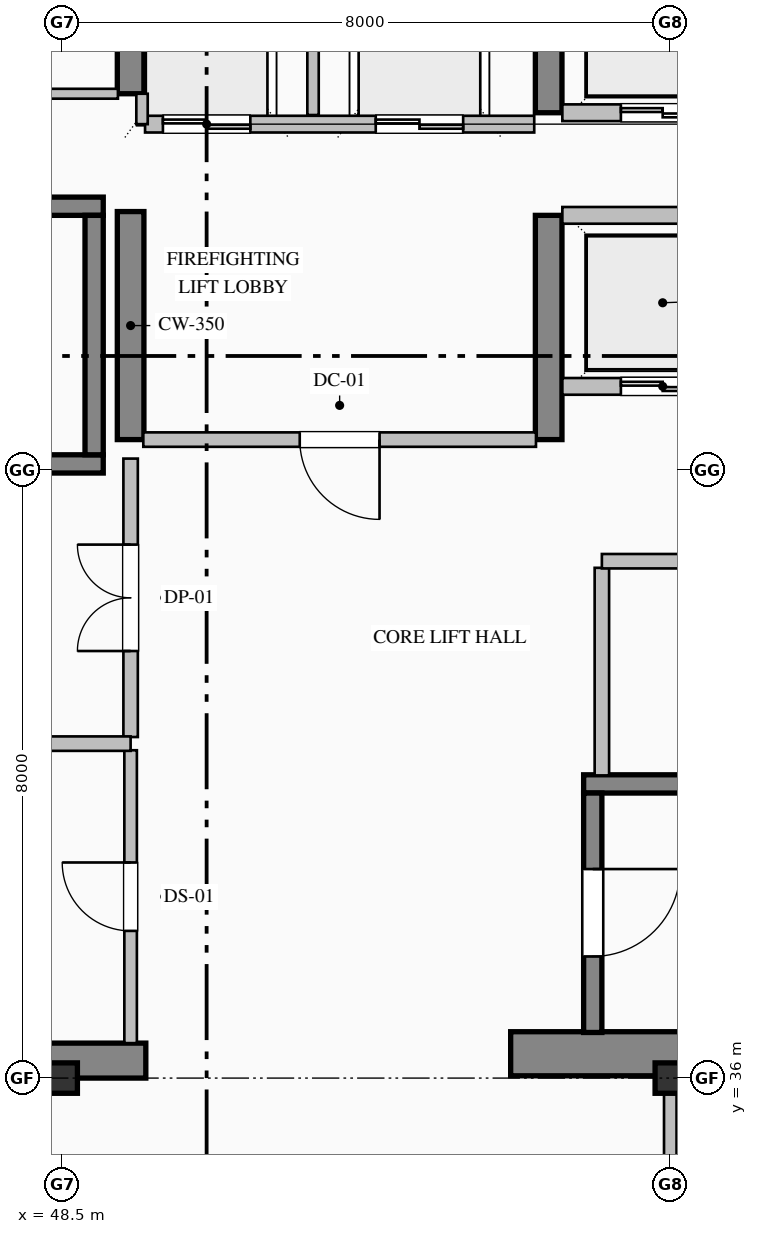
"""IFC4 building model, lengths in metres.
Left out: names, types, materials, properties, quantities, classifications, styles, units other than length and angle.
Written with IfcOpenShell. Run it as: python <this file> out.ifc"""

import sys

from ifc_helpers import new_model, si_unit, direction, frame, frame_2d, origin, origin_2d, place, context, subcontext, project, spatial, rectangle, i_section, extrude, element, fill, save


model = new_model("IFC4")
c1 = context("Model", 3, precision=1e-05, world=origin(), true_north=direction((0.0, 1.0)))
c2 = subcontext(c1, "Body", "Model", "MODEL_VIEW")
j1 = project(units=[si_unit("LENGTHUNIT", "METRE"), si_unit("PLANEANGLEUNIT", "RADIAN")], contexts=[c1])
p1 = place(None, origin())
s1 = spatial("IfcSite", under=j1, at=p1, CompositionType="ELEMENT")
p2 = place(p1, origin())
s2 = spatial("IfcBuilding", under=s1, at=p2, CompositionType="ELEMENT")
p3 = place(p2, frame((0.0, 0.0, 200.4)))
s3 = spatial("IfcBuildingStorey", under=s2, at=p3, CompositionType="ELEMENT", Elevation=200.4)
p4 = place(p3, frame((40.5, 36.23, 0.0), z_axis=(0.0, 0.0, 1.0), x_axis=(1.0, 0.0, 0.0)))
e1 = element("IfcWall", 1, at=p4, inside=s3, PredefinedType="SHEAR", context=c2, shape_type="SweptSolid", body=[
    extrude(rectangle(XDim=9.1, YDim=0.46, at=frame_2d((4.55, 0.0))), origin(), (0.0, 0.0, 1.0), 5.175),
])
p5 = place(p3, frame((54.4, 36.32, 0.0), z_axis=(0.0, 0.0, 1.0), x_axis=(1.0, 0.0, 0.0)))
e2 = element("IfcWall", 2, at=p5, inside=s3, PredefinedType="SHEAR", context=c2, shape_type="SweptSolid", body=[
    extrude(rectangle(XDim=9.6, YDim=0.58, at=frame_2d((4.8, 0.0))), origin(), (0.0, 0.0, 1.0), 5.4),
])
p6 = place(p3, frame((49.4, 44.4, 0.0), z_axis=(0.0, 0.0, 1.0), x_axis=(0.0, 1.0, 0.0)))
e3 = element("IfcWall", 3, at=p6, inside=s3, PredefinedType="SHEAR", context=c2, shape_type="SweptSolid", body=[
    extrude(rectangle(XDim=3.0, YDim=0.35, at=frame_2d((1.5, 0.0))), origin(), (0.0, 0.0, 1.0), 5.175),
])
p7 = place(p3, frame((49.4, 48.95, 0.0), z_axis=(0.0, 0.0, 1.0), x_axis=(0.0, 1.0, 0.0)))
e4 = element("IfcWall", 4, at=p7, inside=s3, PredefinedType="SHEAR", context=c2, shape_type="SweptSolid", body=[
    extrude(rectangle(XDim=2.59, YDim=0.35, at=frame_2d((1.295, 0.0))), origin(), (0.0, 0.0, 1.0), 5.175),
])
p8 = place(p3, frame((54.9, 44.4, 0.0), z_axis=(0.0, 0.0, 1.0), x_axis=(0.0, 1.0, 0.0)))
e5 = element("IfcWall", 5, at=p8, inside=s3, PredefinedType="SHEAR", context=c2, shape_type="SweptSolid", body=[
    extrude(rectangle(XDim=2.95, YDim=0.35, at=frame_2d((1.475, 0.0))), origin(), (0.0, 0.0, 1.0), 5.175),
])
p9 = place(p3, frame((54.9, 48.7, 0.0), z_axis=(0.0, 0.0, 1.0), x_axis=(0.0, 1.0, 0.0)))
e6 = element("IfcWall", 6, at=p9, inside=s3, PredefinedType="SHEAR", context=c2, shape_type="SweptSolid", body=[
    extrude(rectangle(XDim=2.84, YDim=0.35, at=frame_2d((1.42, 0.0))), origin(), (0.0, 0.0, 1.0), 5.175),
])
for number, where, z_axis, x_axis in (
    (7, (48.5, 36.0, 0.0), (0.0, 0.0, 1.0), (1.0, 0.0, 0.0)),
    (8, (56.5, 36.0, 0.0), (0.0, 0.0, 1.0), (1.0, 0.0, 0.0)),
):
    element("IfcColumn", number, at=place(p3, frame(where, z_axis=z_axis, x_axis=x_axis)), inside=s3, PredefinedType="COLUMN", context=c2, shape_type="SweptSolid", body=[
        extrude(i_section(OverallWidth=0.4, OverallDepth=0.4, WebThickness=0.013, FlangeThickness=0.021, FilletRadius=0.022, at=origin_2d()), origin(), (0.0, 0.0, 1.0), 5.4),
    ])
for number, where, z_axis, x_axis in (
    (9, (40.96, 47.47, 0.0), (0.0, 0.0, 1.0), (1.0, 0.0, 0.0)),
    (10, (49.04, 44.08, 0.0), (0.0, 0.0, 1.0), (-1.0, 0.0, 0.0)),
):
    element("IfcWall", number, at=place(p3, frame(where, z_axis=z_axis, x_axis=x_axis)), inside=s3, PredefinedType="SOLIDWALL", context=c2, shape_type="SweptSolid", body=[
        extrude(rectangle(XDim=8.08, YDim=0.24, at=frame_2d((4.04, 0.0))), origin(), (0.0, 0.0, 1.0), 5.4),
    ])
p10 = place(p3, frame((48.92, 44.2, 0.0), z_axis=(0.0, 0.0, 1.0), x_axis=(0.0, 1.0, 0.0)))
e11 = element("IfcWall", 11, at=p10, inside=s3, PredefinedType="SOLIDWALL", context=c2, shape_type="SweptSolid", body=[
    extrude(rectangle(XDim=3.15, YDim=0.24, at=frame_2d((1.575, 0.0))), origin(), (0.0, 0.0, 1.0), 5.4),
])
p11 = place(p3, frame((55.36, 39.87, 0.0), z_axis=(0.0, 0.0, 1.0), x_axis=(1.0, 0.0, 0.0)))
e12 = element("IfcWall", 12, at=p11, inside=s3, PredefinedType="SOLIDWALL", context=c2, shape_type="SweptSolid", body=[
    extrude(rectangle(XDim=8.08, YDim=0.24, at=frame_2d((4.04, 0.0))), origin(), (0.0, 0.0, 1.0), 5.4),
])
p12 = place(p3, frame((55.48, 39.75, 0.0), z_axis=(0.0, 0.0, 1.0), x_axis=(0.0, -1.0, 0.0)))
e13 = element("IfcWall", 13, at=p12, inside=s3, PredefinedType="SOLIDWALL", context=c2, shape_type="SweptSolid", body=[
    extrude(rectangle(XDim=3.15, YDim=0.24, at=frame_2d((1.575, 0.0))), origin(), (0.0, 0.0, 1.0), 5.4),
])
p13 = place(p12, frame((1.0, 0.0, 0.0)))
e14 = element("IfcOpeningElement", 14, at=p13, cuts=e13, PredefinedType="OPENING", context=c2, shape_type="SweptSolid", body=[
    extrude(rectangle(XDim=1.15, YDim=2.2, at=frame_2d((0.575, 1.1))), frame((0.0, 0.13, 0.0), z_axis=(0.0, -1.0, 0.0), x_axis=(1.0, 0.0, 0.0)), (0.0, 0.0, 1.0), 0.26),
])
p14 = place(p3, frame((54.71, 48.55, 0.0), z_axis=(0.0, 0.0, 1.0), x_axis=(-1.0, 0.0, 0.0)))
e15 = element("IfcWall", 15, at=p14, inside=s3, PredefinedType="PARTITIONING", context=c2, shape_type="SweptSolid", body=[
    extrude(rectangle(XDim=5.12, YDim=0.22, at=frame_2d((2.56, 0.0))), origin(), (0.0, 0.0, 1.0), 5.175),
])
p15 = place(p14, frame((3.735, 0.0, 0.0)))
e16 = element("IfcOpeningElement", 16, at=p15, cuts=e15, PredefinedType="OPENING", context=c2, shape_type="SweptSolid", body=[
    extrude(rectangle(XDim=1.15, YDim=2.2, at=frame_2d((0.575, 1.1))), frame((0.0, 0.12, 0.0), z_axis=(0.0, -1.0, 0.0), x_axis=(1.0, 0.0, 0.0)), (0.0, 0.0, 1.0), 0.24),
])
p16 = place(p14, frame((0.935, 0.0, 0.0)))
e17 = element("IfcOpeningElement", 17, at=p16, cuts=e15, PredefinedType="OPENING", context=c2, shape_type="SweptSolid", body=[
    extrude(rectangle(XDim=1.15, YDim=2.2, at=frame_2d((0.575, 1.1))), frame((0.0, 0.12, 0.0), z_axis=(0.0, -1.0, 0.0), x_axis=(1.0, 0.0, 0.0)), (0.0, 0.0, 1.0), 0.24),
])
p17 = place(p3, frame((51.8, 48.67, 0.0), z_axis=(0.0, 0.0, 1.0), x_axis=(0.0, 1.0, 0.0)))
e18 = element("IfcWall", 18, at=p17, inside=s3, PredefinedType="PARTITIONING", context=c2, shape_type="SweptSolid", body=[
    extrude(rectangle(XDim=2.87, YDim=0.15, at=frame_2d((1.435, 0.0))), origin(), (0.0, 0.0, 1.0), 5.175),
])
p18 = place(p3, frame((49.55, 48.55, 0.0), z_axis=(0.0, 0.0, 1.0), x_axis=(0.0, 1.0, 0.0)))
e19 = element("IfcWall", 19, at=p18, inside=s3, PredefinedType="PARTITIONING", context=c2, shape_type="SweptSolid", body=[
    extrude(rectangle(XDim=0.4, YDim=0.15, at=frame_2d((0.2, 0.0))), origin(), (0.0, 0.0, 1.0), 5.175),
])
p19 = place(p3, frame((63.32, 45.1, 0.0), z_axis=(0.0, 0.0, 1.0), x_axis=(-1.0, 0.0, 0.0)))
e20 = element("IfcWall", 20, at=p19, inside=s3, PredefinedType="PARTITIONING", context=c2, shape_type="SweptSolid", body=[
    extrude(rectangle(XDim=8.24, YDim=0.22, at=frame_2d((4.12, 0.0))), origin(), (0.0, 0.0, 1.0), 5.175),
])
p20 = place(p19, frame((6.37, 0.0, 0.0)))
e21 = element("IfcOpeningElement", 21, at=p20, cuts=e20, PredefinedType="OPENING", context=c2, shape_type="SweptSolid", body=[
    extrude(rectangle(XDim=1.1, YDim=2.2, at=frame_2d((0.55, 1.1))), frame((0.0, 0.12, 0.0), z_axis=(0.0, -1.0, 0.0), x_axis=(1.0, 0.0, 0.0)), (0.0, 0.0, 1.0), 0.24),
])
p21 = place(p19, frame((3.57, 0.0, 0.0)))
e22 = element("IfcOpeningElement", 22, at=p21, cuts=e20, PredefinedType="OPENING", context=c2, shape_type="SweptSolid", body=[
    extrude(rectangle(XDim=1.1, YDim=2.2, at=frame_2d((0.55, 1.1))), frame((0.0, 0.12, 0.0), z_axis=(0.0, -1.0, 0.0), x_axis=(1.0, 0.0, 0.0)), (0.0, 0.0, 1.0), 0.24),
])
p22 = place(p19, frame((0.77, 0.0, 0.0)))
e23 = element("IfcOpeningElement", 23, at=p22, cuts=e20, PredefinedType="OPENING", context=c2, shape_type="SweptSolid", body=[
    extrude(rectangle(XDim=1.1, YDim=2.2, at=frame_2d((0.55, 1.1))), frame((0.0, 0.12, 0.0), z_axis=(0.0, -1.0, 0.0), x_axis=(1.0, 0.0, 0.0)), (0.0, 0.0, 1.0), 0.24),
])
p23 = place(p3, frame((55.08, 47.35, 0.0), z_axis=(0.0, 0.0, 1.0), x_axis=(1.0, 0.0, 0.0)))
e24 = element("IfcWall", 24, at=p23, inside=s3, PredefinedType="PARTITIONING", context=c2, shape_type="SweptSolid", body=[
    extrude(rectangle(XDim=8.24, YDim=0.22, at=frame_2d((4.12, 0.0))), origin(), (0.0, 0.0, 1.0), 5.175),
])
p24 = place(p3, frame((63.32, 48.7, 0.0), z_axis=(0.0, 0.0, 1.0), x_axis=(-1.0, 0.0, 0.0)))
e25 = element("IfcWall", 25, at=p24, inside=s3, PredefinedType="PARTITIONING", context=c2, shape_type="SweptSolid", body=[
    extrude(rectangle(XDim=8.24, YDim=0.22, at=frame_2d((4.12, 0.0))), origin(), (0.0, 0.0, 1.0), 5.175),
])
p25 = place(p24, frame((6.37, 0.0, 0.0)))
e26 = element("IfcOpeningElement", 26, at=p25, cuts=e25, PredefinedType="OPENING", context=c2, shape_type="SweptSolid", body=[
    extrude(rectangle(XDim=1.1, YDim=2.2, at=frame_2d((0.55, 1.1))), frame((0.0, 0.12, 0.0), z_axis=(0.0, -1.0, 0.0), x_axis=(1.0, 0.0, 0.0)), (0.0, 0.0, 1.0), 0.24),
])
p26 = place(p24, frame((3.57, 0.0, 0.0)))
e27 = element("IfcOpeningElement", 27, at=p26, cuts=e25, PredefinedType="OPENING", context=c2, shape_type="SweptSolid", body=[
    extrude(rectangle(XDim=1.1, YDim=2.2, at=frame_2d((0.55, 1.1))), frame((0.0, 0.12, 0.0), z_axis=(0.0, -1.0, 0.0), x_axis=(1.0, 0.0, 0.0)), (0.0, 0.0, 1.0), 0.24),
])
p27 = place(p24, frame((0.77, 0.0, 0.0)))
e28 = element("IfcOpeningElement", 28, at=p27, cuts=e25, PredefinedType="OPENING", context=c2, shape_type="SweptSolid", body=[
    extrude(rectangle(XDim=1.1, YDim=2.2, at=frame_2d((0.55, 1.1))), frame((0.0, 0.12, 0.0), z_axis=(0.0, -1.0, 0.0), x_axis=(1.0, 0.0, 0.0)), (0.0, 0.0, 1.0), 0.24),
])
p28 = place(p3, frame((45.2, 48.95, 0.0), z_axis=(0.0, 0.0, 1.0), x_axis=(1.0, 0.0, 0.0)))
e29 = element("IfcWall", 29, at=p28, inside=s3, PredefinedType="PARTITIONING", context=c2, shape_type="SweptSolid", body=[
    extrude(rectangle(XDim=4.033, YDim=0.13, at=frame_2d((2.017, 0.0))), origin(), (0.0, 0.0, 1.0), 5.175),
])
p29 = place(p28, frame((1.556, 0.0, 0.0)))
e30 = element("IfcOpeningElement", 30, at=p29, cuts=e29, PredefinedType="OPENING", context=c2, shape_type="SweptSolid", body=[
    extrude(rectangle(XDim=0.92, YDim=2.15, at=frame_2d((0.46, 1.075))), frame((0.0, 0.075, 0.0), z_axis=(0.0, -1.0, 0.0), x_axis=(1.0, 0.0, 0.0)), (0.0, 0.0, 1.0), 0.15),
])
p30 = place(p3, frame((54.733, 44.4, 0.0), z_axis=(0.0, 0.0, 1.0), x_axis=(-1.0, 0.0, 0.0)))
e31 = element("IfcWall", 31, at=p30, inside=s3, PredefinedType="PARTITIONING", context=c2, shape_type="SweptSolid", body=[
    extrude(rectangle(XDim=5.166, YDim=0.19, at=frame_2d((2.583, 0.0))), origin(), (0.0, 0.0, 1.0), 5.175),
])
p31 = place(p30, frame((2.058, 0.0, 0.0)))
e32 = element("IfcOpeningElement", 32, at=p31, cuts=e31, PredefinedType="OPENING", context=c2, shape_type="SweptSolid", body=[
    extrude(rectangle(XDim=1.05, YDim=2.15, at=frame_2d((0.525, 1.075))), frame((0.0, 0.105, 0.0), z_axis=(0.0, -1.0, 0.0), x_axis=(1.0, 0.0, 0.0)), (0.0, 0.0, 1.0), 0.21),
])
p32 = place(p3, frame((49.4, 36.46, 0.0), z_axis=(0.0, 0.0, 1.0), x_axis=(0.0, 1.0, 0.0)))
e33 = element("IfcWall", 33, at=p32, inside=s3, PredefinedType="PARTITIONING", context=c2, shape_type="SweptSolid", body=[
    extrude(rectangle(XDim=3.853, YDim=0.165, at=frame_2d((1.927, 0.0))), origin(), (0.0, 0.0, 1.0), 4.417),
])
p33 = place(p32, frame((1.477, 0.0, 0.0)))
e34 = element("IfcOpeningElement", 34, at=p33, cuts=e33, PredefinedType="OPENING", context=c2, shape_type="SweptSolid", body=[
    extrude(rectangle(XDim=0.9, YDim=2.15, at=frame_2d((0.45, 1.075))), frame((0.0, 0.093, 0.0), z_axis=(0.0, -1.0, 0.0), x_axis=(1.0, 0.0, 0.0)), (0.0, 0.0, 1.0), 0.185),
])
p34 = place(p3, frame((49.4, 40.487, 0.0), z_axis=(0.0, 0.0, 1.0), x_axis=(0.0, 1.0, 0.0)))
e35 = element("IfcWall", 35, at=p34, inside=s3, PredefinedType="PARTITIONING", context=c2, shape_type="SweptSolid", body=[
    extrude(rectangle(XDim=3.663, YDim=0.19, at=frame_2d((1.832, 0.0))), origin(), (0.0, 0.0, 1.0), 4.417),
])
p35 = place(p34, frame((1.132, 0.0, 0.0)))
e36 = element("IfcOpeningElement", 36, at=p35, cuts=e35, PredefinedType="OPENING", context=c2, shape_type="SweptSolid", body=[
    extrude(rectangle(XDim=1.4, YDim=2.25, at=frame_2d((0.7, 1.125))), frame((0.0, 0.105, 0.0), z_axis=(0.0, -1.0, 0.0), x_axis=(1.0, 0.0, 0.0)), (0.0, 0.0, 1.0), 0.21),
])
p36 = place(p3, frame((55.6, 42.713, 0.0), z_axis=(0.0, 0.0, 1.0), x_axis=(0.0, -1.0, 0.0)))
e37 = element("IfcWall", 37, at=p36, inside=s3, PredefinedType="PARTITIONING", context=c2, shape_type="SweptSolid", body=[
    extrude(rectangle(XDim=2.731, YDim=0.19, at=frame_2d((1.365, 0.0))), origin(), (0.0, 0.0, 1.0), 5.175),
])
p37 = place(p3, frame((40.96, 40.4, 0.0), z_axis=(0.0, 0.0, 1.0), x_axis=(1.0, 0.0, 0.0)))
e38 = element("IfcWall", 38, at=p37, inside=s3, PredefinedType="PARTITIONING", context=c2, shape_type="SweptSolid", body=[
    extrude(rectangle(XDim=8.44, YDim=0.19, at=frame_2d((4.22, 0.0))), origin(), (0.0, 0.0, 1.0), 5.175),
])
p38 = place(p3, frame((59.5, 42.8, 0.0), z_axis=(0.0, 0.0, 1.0), x_axis=(-1.0, 0.0, 0.0)))
e39 = element("IfcWall", 39, at=p38, inside=s3, PredefinedType="PARTITIONING", context=c2, shape_type="SweptSolid", body=[
    extrude(rectangle(XDim=3.9, YDim=0.19, at=frame_2d((1.95, 0.0))), origin(), (0.0, 0.0, 1.0), 5.175),
])
p39 = place(p38, frame((1.25, 0.0, 0.0)))
e40 = element("IfcOpeningElement", 40, at=p39, cuts=e39, PredefinedType="OPENING", context=c2, shape_type="SweptSolid", body=[
    extrude(rectangle(XDim=1.4, YDim=2.25, at=frame_2d((0.7, 1.125))), frame((0.0, 0.105, 0.0), z_axis=(0.0, -1.0, 0.0), x_axis=(1.0, 0.0, 0.0)), (0.0, 0.0, 1.0), 0.21),
])
p40 = place(p3, frame((56.5, 36.0, 0.0), z_axis=(0.0, 0.0, 1.0), x_axis=(0.0, -1.0, 0.0)))
e41 = element("IfcWall", 41, at=p40, inside=s3, PredefinedType="PARTITIONING", context=c2, shape_type="SweptSolid", body=[
    extrude(rectangle(XDim=5.525, YDim=0.165, at=frame_2d((2.763, 0.0))), origin(), (0.0, 0.0, 1.0), 4.579),
])
p41 = place(p13, origin())
e42 = element("IfcDoor", 42, at=p41, inside=s3, OperationType="SINGLE_SWING_LEFT", PredefinedType="DOOR", context=c2, shape_type="SweptSolid", body=[
    extrude(rectangle(XDim=1.15, YDim=2.2, at=frame_2d((0.575, 1.1))), frame((0.0, 0.025, 0.0), z_axis=(0.0, -1.0, 0.0), x_axis=(1.0, 0.0, 0.0)), (0.0, 0.0, 1.0), 0.05),
])
fill(e14, e42)
p42 = place(p15, origin())
e43 = element("IfcDoor", 43, at=p42, inside=s3, OperationType="DOUBLE_DOOR_SLIDING", PredefinedType="DOOR", context=c2, shape_type="SweptSolid", body=[
    extrude(rectangle(XDim=1.15, YDim=2.2, at=frame_2d((0.575, 1.1))), frame((0.0, 0.025, 0.0), z_axis=(0.0, -1.0, 0.0), x_axis=(1.0, 0.0, 0.0)), (0.0, 0.0, 1.0), 0.05),
])
fill(e16, e43)
p43 = place(p16, origin())
e44 = element("IfcDoor", 44, at=p43, inside=s3, OperationType="DOUBLE_DOOR_SLIDING", PredefinedType="DOOR", context=c2, shape_type="SweptSolid", body=[
    extrude(rectangle(XDim=1.15, YDim=2.2, at=frame_2d((0.575, 1.1))), frame((0.0, 0.025, 0.0), z_axis=(0.0, -1.0, 0.0), x_axis=(1.0, 0.0, 0.0)), (0.0, 0.0, 1.0), 0.05),
])
fill(e17, e44)
p44 = place(p20, origin())
e45 = element("IfcDoor", 45, at=p44, inside=s3, OperationType="DOUBLE_DOOR_SLIDING", PredefinedType="DOOR", context=c2, shape_type="SweptSolid", body=[
    extrude(rectangle(XDim=1.1, YDim=2.2, at=frame_2d((0.55, 1.1))), frame((0.0, 0.025, 0.0), z_axis=(0.0, -1.0, 0.0), x_axis=(1.0, 0.0, 0.0)), (0.0, 0.0, 1.0), 0.05),
])
fill(e21, e45)
p45 = place(p25, origin())
e46 = element("IfcDoor", 46, at=p45, inside=s3, OperationType="DOUBLE_DOOR_SLIDING", PredefinedType="DOOR", context=c2, shape_type="SweptSolid", body=[
    extrude(rectangle(XDim=1.1, YDim=2.2, at=frame_2d((0.55, 1.1))), frame((0.0, 0.025, 0.0), z_axis=(0.0, -1.0, 0.0), x_axis=(1.0, 0.0, 0.0)), (0.0, 0.0, 1.0), 0.05),
])
fill(e26, e46)
p46 = place(p31, origin())
e47 = element("IfcDoor", 47, at=p46, inside=s3, OperationType="SINGLE_SWING_LEFT", PredefinedType="DOOR", context=c2, shape_type="SweptSolid", body=[
    extrude(rectangle(XDim=1.05, YDim=2.15, at=frame_2d((0.525, 1.075))), frame((0.0, 0.025, 0.0), z_axis=(0.0, -1.0, 0.0), x_axis=(1.0, 0.0, 0.0)), (0.0, 0.0, 1.0), 0.05),
])
fill(e32, e47)
p47 = place(p33, origin())
e48 = element("IfcDoor", 48, at=p47, inside=s3, OperationType="SINGLE_SWING_RIGHT", PredefinedType="DOOR", context=c2, shape_type="SweptSolid", body=[
    extrude(rectangle(XDim=0.9, YDim=2.15, at=frame_2d((0.45, 1.075))), frame((0.0, 0.025, 0.0), z_axis=(0.0, -1.0, 0.0), x_axis=(1.0, 0.0, 0.0)), (0.0, 0.0, 1.0), 0.05),
])
fill(e34, e48)
p48 = place(p35, origin())
e49 = element("IfcDoor", 49, at=p48, inside=s3, OperationType="DOUBLE_DOOR_SINGLE_SWING", PredefinedType="DOOR", context=c2, shape_type="SweptSolid", body=[
    extrude(rectangle(XDim=1.4, YDim=2.25, at=frame_2d((0.7, 1.125))), frame((0.0, 0.025, 0.0), z_axis=(0.0, -1.0, 0.0), x_axis=(1.0, 0.0, 0.0)), (0.0, 0.0, 1.0), 0.05),
])
fill(e36, e49)
save(model, sys.argv[1])
